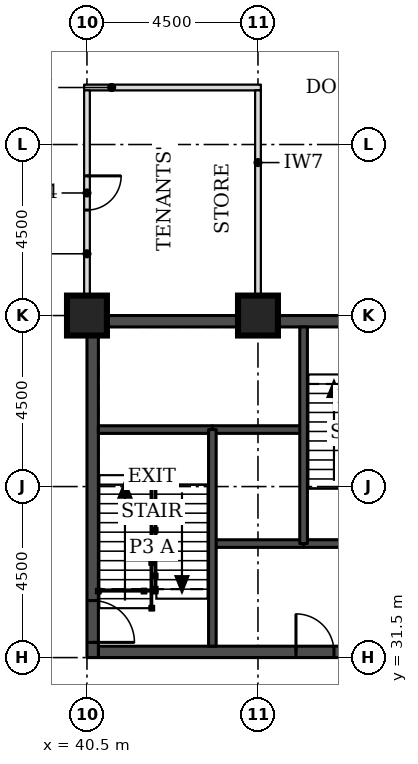
"""IFC4 building model, lengths in metres.
Left out: names, types, materials, properties, quantities, classifications, styles, units other than length and angle.
Written with IfcOpenShell. Run it as: python <this file> out.ifc"""

import sys

from ifc_helpers import new_model, si_unit, direction, frame, frame_2d, origin, origin_2d, place, context, subcontext, project, spatial, rectangle, extrude, element, fill, save


model = new_model("IFC4")
c1 = context("Model", 3, precision=1e-05, world=origin(), true_north=direction((0.0, 1.0)))
c2 = subcontext(c1, "Body", "Model", "MODEL_VIEW")
j1 = project(units=[si_unit("LENGTHUNIT", "METRE"), si_unit("PLANEANGLEUNIT", "RADIAN")], contexts=[c1])
p1 = place(None, origin())
s1 = spatial("IfcSite", under=j1, at=p1, CompositionType="ELEMENT")
p2 = place(p1, origin())
s2 = spatial("IfcBuilding", under=s1, at=p2, CompositionType="ELEMENT")
p3 = place(p2, frame((0.0, 0.0, 93.7)))
s3 = spatial("IfcBuildingStorey", under=s2, at=p3, CompositionType="ELEMENT", Elevation=93.7)
for number, where, z_axis, x_axis in (
    (1, (40.5, 40.5, 0.0), (0.0, 0.0, 1.0), (1.0, 0.0, 0.0)),
    (2, (45.0, 40.5, 0.0), (0.0, 0.0, 1.0), (1.0, 0.0, 0.0)),
):
    element("IfcColumn", number, at=place(p3, frame(where, z_axis=z_axis, x_axis=x_axis)), inside=s3, PredefinedType="COLUMN", context=c2, shape_type="SweptSolid", body=[
        extrude(rectangle(XDim=1.05, YDim=1.05, at=origin_2d()), origin(), (0.0, 0.0, 1.0), 3.7),
    ])
p4 = place(p3, frame((40.8, 31.65, 0.0), z_axis=(0.0, 0.0, 1.0), x_axis=(1.0, 0.0, 0.0)))
e3 = element("IfcWall", 3, at=p4, inside=s3, PredefinedType="SHEAR", context=c2, shape_type="SweptSolid", body=[
    extrude(rectangle(XDim=8.4, YDim=0.3, at=frame_2d((4.2, 0.0))), origin(), (0.0, 0.0, 1.0), 3.7),
])
p5 = place(p4, frame((5.2, 0.0, 0.0)))
e4 = element("IfcOpeningElement", 4, at=p5, cuts=e3, PredefinedType="OPENING", context=c2, shape_type="SweptSolid", body=[
    extrude(rectangle(XDim=1.0, YDim=2.1, at=frame_2d((0.5, 1.05))), frame((0.0, 0.16, 0.0), z_axis=(0.0, -1.0, 0.0), x_axis=(1.0, 0.0, 0.0)), (0.0, 0.0, 1.0), 0.32),
])
p6 = place(p3, frame((40.8, 40.35, 0.0), z_axis=(0.0, 0.0, 1.0), x_axis=(1.0, 0.0, 0.0)))
e5 = element("IfcWall", 5, at=p6, inside=s3, PredefinedType="SHEAR", context=c2, shape_type="SweptSolid", body=[
    extrude(rectangle(XDim=8.4, YDim=0.3, at=frame_2d((4.2, 0.0))), origin(), (0.0, 0.0, 1.0), 3.7),
])
p7 = place(p6, frame((6.4, 0.0, 0.0)))
e6 = element("IfcOpeningElement", 6, at=p7, cuts=e5, PredefinedType="OPENING", context=c2, shape_type="SweptSolid", body=[
    extrude(rectangle(XDim=1.1, YDim=2.1, at=frame_2d((0.55, 1.05))), frame((0.0, 0.16, 0.0), z_axis=(0.0, -1.0, 0.0), x_axis=(1.0, 0.0, 0.0)), (0.0, 0.0, 1.0), 0.32),
])
p8 = place(p3, frame((40.65, 31.5, 0.0), z_axis=(0.0, 0.0, 1.0), x_axis=(0.0, 1.0, 0.0)))
e7 = element("IfcWall", 7, at=p8, inside=s3, PredefinedType="SHEAR", context=c2, shape_type="SweptSolid", body=[
    extrude(rectangle(XDim=9.0, YDim=0.3, at=frame_2d((4.5, 0.0))), origin(), (0.0, 0.0, 1.0), 3.7),
])
p9 = place(p8, frame((0.4, 0.0, 0.0)))
e8 = element("IfcOpeningElement", 8, at=p9, cuts=e7, PredefinedType="OPENING", context=c2, shape_type="SweptSolid", body=[
    extrude(rectangle(XDim=1.1, YDim=2.1, at=frame_2d((0.55, 1.05))), frame((0.0, 0.16, 0.0), z_axis=(0.0, -1.0, 0.0), x_axis=(1.0, 0.0, 0.0)), (0.0, 0.0, 1.0), 0.32),
])
p10 = place(p3, frame((40.425, 46.5, 0.0), z_axis=(0.0, 0.0, 1.0), x_axis=(1.0, 0.0, 0.0)))
e9 = element("IfcWall", 9, at=p10, inside=s3, PredefinedType="PARTITIONING", context=c2, shape_type="SweptSolid", body=[
    extrude(rectangle(XDim=4.65, YDim=0.15, at=frame_2d((2.325, 0.0))), origin(), (0.0, 0.0, 1.0), 3.55),
])
p11 = place(p3, frame((40.5, 41.025, 0.0), z_axis=(0.0, 0.0, 1.0), x_axis=(0.0, 1.0, 0.0)))
e10 = element("IfcWall", 10, at=p11, inside=s3, PredefinedType="PARTITIONING", context=c2, shape_type="SweptSolid", body=[
    extrude(rectangle(XDim=5.4, YDim=0.15, at=frame_2d((2.7, 0.0))), origin(), (0.0, 0.0, 1.0), 3.55),
])
p12 = place(p11, frame((2.25, 0.0, 0.0)))
e11 = element("IfcOpeningElement", 11, at=p12, cuts=e10, PredefinedType="OPENING", context=c2, shape_type="SweptSolid", body=[
    extrude(rectangle(XDim=0.9, YDim=2.1, at=frame_2d((0.45, 1.05))), frame((0.0, 0.085, 0.0), z_axis=(0.0, -1.0, 0.0), x_axis=(1.0, 0.0, 0.0)), (0.0, 0.0, 1.0), 0.17),
])
p13 = place(p3, frame((45.0, 41.025, 0.0), z_axis=(0.0, 0.0, 1.0), x_axis=(0.0, 1.0, 0.0)))
e12 = element("IfcWall", 12, at=p13, inside=s3, PredefinedType="PARTITIONING", context=c2, shape_type="SweptSolid", body=[
    extrude(rectangle(XDim=5.4, YDim=0.15, at=frame_2d((2.7, 0.0))), origin(), (0.0, 0.0, 1.0), 3.55),
])
p14 = place(p3, frame((43.8, 34.5, 0.0), z_axis=(0.0, 0.0, 1.0), x_axis=(1.0, 0.0, 0.0)))
e13 = element("IfcWall", 13, at=p14, inside=s3, PredefinedType="SOLIDWALL", context=c2, shape_type="SweptSolid", body=[
    extrude(rectangle(XDim=2.4, YDim=0.2, at=frame_2d((1.2, 0.0))), origin(), (0.0, 0.0, 1.0), 3.55),
])
p15 = place(p3, frame((46.2, 34.5, 0.0), z_axis=(0.0, 0.0, 1.0), x_axis=(1.0, 0.0, 0.0)))
e14 = element("IfcWall", 14, at=p15, inside=s3, PredefinedType="SOLIDWALL", context=c2, shape_type="SweptSolid", body=[
    extrude(rectangle(XDim=3.0, YDim=0.2, at=frame_2d((1.5, 0.0))), origin(), (0.0, 0.0, 1.0), 3.55),
])
p16 = place(p3, frame((43.8, 37.5, 0.0), z_axis=(0.0, 0.0, 1.0), x_axis=(1.0, 0.0, 0.0)))
e15 = element("IfcWall", 15, at=p16, inside=s3, PredefinedType="SOLIDWALL", context=c2, shape_type="SweptSolid", body=[
    extrude(rectangle(XDim=2.4, YDim=0.2, at=frame_2d((1.2, 0.0))), origin(), (0.0, 0.0, 1.0), 3.7),
])
p17 = place(p3, frame((40.8, 37.5, 0.0), z_axis=(0.0, 0.0, 1.0), x_axis=(1.0, 0.0, 0.0)))
e16 = element("IfcWall", 16, at=p17, inside=s3, PredefinedType="SOLIDWALL", context=c2, shape_type="SweptSolid", body=[
    extrude(rectangle(XDim=3.0, YDim=0.2, at=frame_2d((1.5, 0.0))), origin(), (0.0, 0.0, 1.0), 3.55),
])
for number, where, z_axis, x_axis in (
    (17, (43.8, 31.8, 0.0), (0.0, 0.0, 1.0), (0.0, 1.0, 0.0)),
    (18, (46.2, 34.5, 0.0), (0.0, 0.0, 1.0), (0.0, 1.0, 0.0)),
):
    element("IfcWall", number, at=place(p3, frame(where, z_axis=z_axis, x_axis=x_axis)), inside=s3, PredefinedType="SOLIDWALL", context=c2, shape_type="SweptSolid", body=[
        extrude(rectangle(XDim=5.7, YDim=0.2, at=frame_2d((2.85, 0.0))), origin(), (0.0, 0.0, 1.0), 3.55),
    ])
p18 = place(p12, frame((0.9, 0.0, 0.0), z_axis=(0.0, 0.0, 1.0), x_axis=(-1.0, 0.0, 0.0)))
e19 = element("IfcDoor", 19, at=p18, inside=s3, OperationType="SINGLE_SWING_LEFT", PredefinedType="DOOR", context=c2, shape_type="SweptSolid", body=[
    extrude(rectangle(XDim=0.9, YDim=2.1, at=frame_2d((0.45, 1.05))), frame((0.0, 0.025, 0.0), z_axis=(0.0, -1.0, 0.0), x_axis=(1.0, 0.0, 0.0)), (0.0, 0.0, 1.0), 0.05),
])
fill(e11, e19)
p19 = place(p9, frame((1.1, 0.0, 0.0), z_axis=(0.0, 0.0, 1.0), x_axis=(-1.0, 0.0, 0.0)))
e20 = element("IfcDoor", 20, at=p19, inside=s3, OperationType="SINGLE_SWING_RIGHT", PredefinedType="DOOR", context=c2, shape_type="SweptSolid", body=[
    extrude(rectangle(XDim=1.1, YDim=2.1, at=frame_2d((0.55, 1.05))), frame((0.0, 0.025, 0.0), z_axis=(0.0, -1.0, 0.0), x_axis=(1.0, 0.0, 0.0)), (0.0, 0.0, 1.0), 0.05),
])
fill(e8, e20)
p20 = place(p5, origin())
e21 = element("IfcDoor", 21, at=p20, inside=s3, OperationType="SINGLE_SWING_LEFT", PredefinedType="DOOR", context=c2, shape_type="SweptSolid", body=[
    extrude(rectangle(XDim=1.0, YDim=2.1, at=frame_2d((0.5, 1.05))), frame((0.0, 0.025, 0.0), z_axis=(0.0, -1.0, 0.0), x_axis=(1.0, 0.0, 0.0)), (0.0, 0.0, 1.0), 0.05),
])
fill(e4, e21)
save(model, sys.argv[1])
